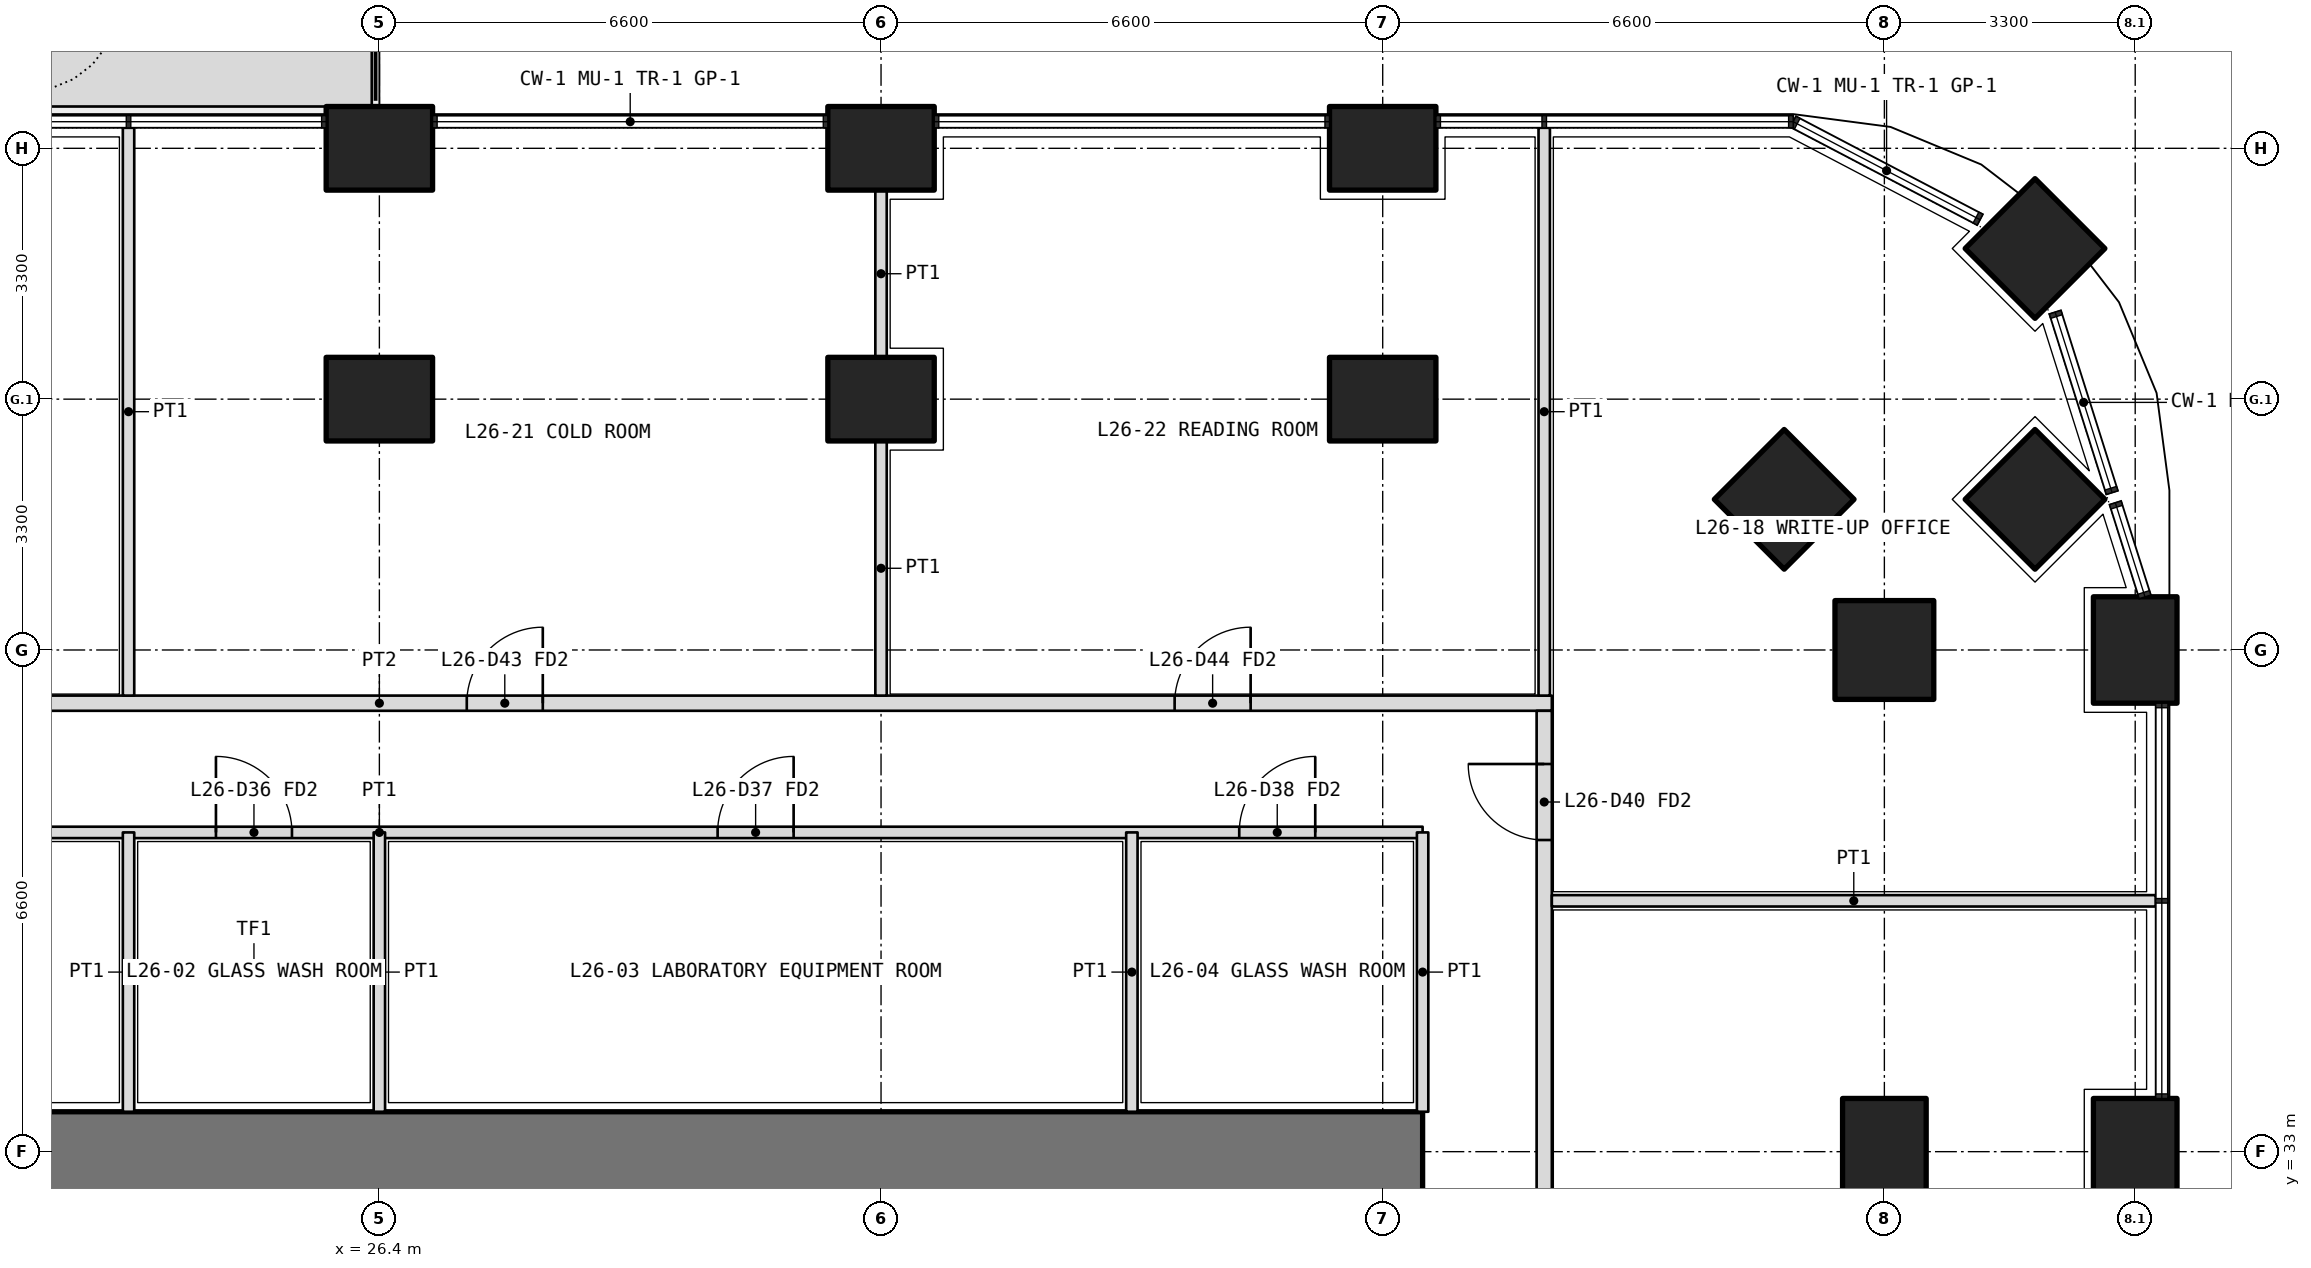
"""IFC4 building model, lengths in metres.
Left out: names, types, materials, properties, quantities, classifications, styles, units other than length and angle.
Written with IfcOpenShell. Run it as: python <this file> out.ifc"""

import sys

from ifc_helpers import new_model, si_unit, direction, frame, frame_2d, origin, origin_2d, place, context, subcontext, project, spatial, polyline, rectangle, outline, extrude, element, fill, save


model = new_model("IFC4")
c1 = context("Model", 3, precision=1e-05, world=origin(), true_north=direction((0.0, 1.0)))
c2 = subcontext(c1, "Body", "Model", "MODEL_VIEW")
j1 = project(units=[si_unit("LENGTHUNIT", "METRE"), si_unit("PLANEANGLEUNIT", "RADIAN")], contexts=[c1])
p1 = place(None, origin())
s1 = spatial("IfcSite", under=j1, at=p1, CompositionType="ELEMENT")
p2 = place(p1, origin())
s2 = spatial("IfcBuilding", under=s1, at=p2, CompositionType="ELEMENT")
p3 = place(p2, frame((0.0, 0.0, 115.8)))
s3 = spatial("IfcBuildingStorey", under=s2, at=p3, CompositionType="ELEMENT", Elevation=115.8)
p4 = place(p3, frame((48.182, 44.882, 0.0), z_axis=(0.0, 0.0, 1.0), x_axis=(0.707106781187, 0.707106781187, 0.0)))
e1 = element("IfcColumn", 1, at=p4, inside=s3, PredefinedType="COLUMN", context=c2, shape_type="SweptSolid", body=[
    extrude(rectangle(XDim=1.3, YDim=1.3, at=origin_2d()), origin(), (0.0, 0.0, 1.0), 4.2),
])
for number, where, z_axis, x_axis in (
    (2, (49.5, 33.0, 0.0), (0.0, 0.0, 1.0), (0.0, 1.0, 0.0)),
    (3, (49.5, 39.6, 0.0), (0.0, 0.0, 1.0), (0.0, 1.0, 0.0)),
    (4, (26.4, 46.2, 0.0), (0.0, 0.0, 1.0), (1.0, 0.0, 0.0)),
    (5, (33.0, 46.2, 0.0), (0.0, 0.0, 1.0), (1.0, 0.0, 0.0)),
    (6, (39.6, 46.2, 0.0), (0.0, 0.0, 1.0), (1.0, 0.0, 0.0)),
):
    element("IfcColumn", number, at=place(p3, frame(where, z_axis=z_axis, x_axis=x_axis)), inside=s3, PredefinedType="COLUMN", context=c2, shape_type="SweptSolid", body=[
        extrude(rectangle(XDim=1.4, YDim=1.1, at=origin_2d()), origin(), (0.0, 0.0, 1.0), 4.2),
    ])
for number, where, z_axis, x_axis in (
    (7, (46.2, 39.6, 0.0), (0.0, 0.0, 1.0), (1.0, 0.0, 0.0)),
    (8, (48.182, 41.582, 0.0), (0.0, 0.0, 1.0), (0.707, 0.707, 0.0)),
):
    element("IfcColumn", number, at=place(p3, frame(where, z_axis=z_axis, x_axis=x_axis)), inside=s3, PredefinedType="COLUMN", context=c2, shape_type="SweptSolid", body=[
        extrude(rectangle(XDim=1.3, YDim=1.3, at=origin_2d()), origin(), (0.0, 0.0, 1.0), 4.2),
    ])
for number, where, z_axis, x_axis in (
    (9, (26.4, 42.9, 0.0), (0.0, 0.0, 1.0), (1.0, 0.0, 0.0)),
    (10, (33.0, 42.9, 0.0), (0.0, 0.0, 1.0), (1.0, 0.0, 0.0)),
    (11, (39.6, 42.9, 0.0), (0.0, 0.0, 1.0), (1.0, 0.0, 0.0)),
):
    element("IfcColumn", number, at=place(p3, frame(where, z_axis=z_axis, x_axis=x_axis)), inside=s3, PredefinedType="COLUMN", context=c2, shape_type="SweptSolid", body=[
        extrude(rectangle(XDim=1.4, YDim=1.1, at=origin_2d()), origin(), (0.0, 0.0, 1.0), 4.2),
    ])
p5 = place(p3, frame((44.882, 41.582, 0.0), z_axis=(0.0, 0.0, 1.0), x_axis=(0.707106781187, 0.707106781187, 0.0)))
e12 = element("IfcColumn", 12, at=p5, inside=s3, PredefinedType="COLUMN", context=c2, shape_type="SweptSolid", body=[
    extrude(rectangle(XDim=1.3, YDim=1.3, at=origin_2d()), origin(), (0.0, 0.0, 1.0), 4.2),
])
p6 = place(p3, frame((46.2, 33.0, 0.0), z_axis=(0.0, 0.0, 1.0), x_axis=(0.0, 1.0, 0.0)))
e13 = element("IfcColumn", 13, at=p6, inside=s3, PredefinedType="COLUMN", context=c2, shape_type="SweptSolid", body=[
    extrude(rectangle(XDim=1.4, YDim=1.1, at=origin_2d()), origin(), (0.0, 0.0, 1.0), 4.2),
])
p7 = place(p3, origin())
e14 = element("IfcWall", 14, at=p7, inside=s3, PredefinedType="USERDEFINED", context=c2, shape_type="SweptSolid", body=[
    extrude(outline(polyline([(17.25, 46.75), (26.3, 46.75), (26.3, 47.75), (17.25, 47.75), (17.25, 46.75)]), holes=[polyline([(17.4, 46.9), (26.15, 46.9), (26.15, 47.6), (17.4, 47.6), (17.4, 46.9)])]), origin(), (0.0, 0.0, 1.0), 1.05),
])
p8 = place(p3, frame((40.125, 33.0, 0.0), z_axis=(0.0, 0.0, 1.0), x_axis=(-1.0, 0.0, 0.0)))
e15 = element("IfcWall", 15, at=p8, inside=s3, PredefinedType="SHEAR", context=c2, shape_type="SweptSolid", body=[
    extrude(rectangle(XDim=27.45, YDim=1.05, at=frame_2d((13.725, 0.0))), origin(), (0.0, 0.0, 1.0), 4.2),
])
p9 = place(p3, frame((12.675, 37.2, 0.0), z_axis=(0.0, 0.0, 1.0), x_axis=(1.0, 0.0, 0.0)))
e16 = element("IfcWall", 16, at=p9, inside=s3, PredefinedType="PARTITIONING", context=c2, shape_type="SweptSolid", body=[
    extrude(rectangle(XDim=27.45, YDim=0.15, at=frame_2d((13.725, 0.0))), origin(), (0.0, 0.0, 1.0), 2.85),
])
p10 = place(p9, frame((4.712, 0.0, 0.0)))
e17 = element("IfcOpeningElement", 17, at=p10, cuts=e16, PredefinedType="OPENING", context=c2, shape_type="SweptSolid", body=[
    extrude(rectangle(XDim=1.0, YDim=2.1, at=frame_2d((0.5, 1.05))), frame((0.0, 0.085, 0.0), z_axis=(0.0, -1.0, 0.0), x_axis=(1.0, 0.0, 0.0)), (0.0, 0.0, 1.0), 0.17),
])
p11 = place(p9, frame((11.575, 0.0, 0.0)))
e18 = element("IfcOpeningElement", 18, at=p11, cuts=e16, PredefinedType="OPENING", context=c2, shape_type="SweptSolid", body=[
    extrude(rectangle(XDim=1.0, YDim=2.1, at=frame_2d((0.5, 1.05))), frame((0.0, 0.085, 0.0), z_axis=(0.0, -1.0, 0.0), x_axis=(1.0, 0.0, 0.0)), (0.0, 0.0, 1.0), 0.17),
])
p12 = place(p9, frame((18.175, 0.0, 0.0)))
e19 = element("IfcOpeningElement", 19, at=p12, cuts=e16, PredefinedType="OPENING", context=c2, shape_type="SweptSolid", body=[
    extrude(rectangle(XDim=1.0, YDim=2.1, at=frame_2d((0.5, 1.05))), frame((0.0, 0.085, 0.0), z_axis=(0.0, -1.0, 0.0), x_axis=(1.0, 0.0, 0.0)), (0.0, 0.0, 1.0), 0.17),
])
p13 = place(p9, frame((25.038, 0.0, 0.0)))
e20 = element("IfcOpeningElement", 20, at=p13, cuts=e16, PredefinedType="OPENING", context=c2, shape_type="SweptSolid", body=[
    extrude(rectangle(XDim=1.0, YDim=2.1, at=frame_2d((0.5, 1.05))), frame((0.0, 0.085, 0.0), z_axis=(0.0, -1.0, 0.0), x_axis=(1.0, 0.0, 0.0)), (0.0, 0.0, 1.0), 0.17),
])
p14 = place(p3, frame((40.125, 33.525, 0.0), z_axis=(0.0, 0.0, 1.0), x_axis=(0.0, 1.0, 0.0)))
e21 = element("IfcWall", 21, at=p14, inside=s3, PredefinedType="PARTITIONING", context=c2, shape_type="SweptSolid", body=[
    extrude(rectangle(XDim=3.675, YDim=0.15, at=frame_2d((1.837, 0.0))), origin(), (0.0, 0.0, 1.0), 2.85),
])
p15 = place(p3, frame((23.1, 33.525, 0.0), z_axis=(0.0, 0.0, 1.0), x_axis=(0.0, 1.0, 0.0)))
e22 = element("IfcWall", 22, at=p15, inside=s3, PredefinedType="PARTITIONING", context=c2, shape_type="SweptSolid", body=[
    extrude(rectangle(XDim=3.675, YDim=0.15, at=frame_2d((1.837, 0.0))), origin(), (0.0, 0.0, 1.0), 3.9),
])
p16 = place(p3, frame((26.4, 33.525, 0.0), z_axis=(0.0, 0.0, 1.0), x_axis=(0.0, 1.0, 0.0)))
e23 = element("IfcWall", 23, at=p16, inside=s3, PredefinedType="PARTITIONING", context=c2, shape_type="SweptSolid", body=[
    extrude(rectangle(XDim=3.675, YDim=0.15, at=frame_2d((1.837, 0.0))), origin(), (0.0, 0.0, 1.0), 2.85),
])
p17 = place(p3, frame((36.3, 33.525, 0.0), z_axis=(0.0, 0.0, 1.0), x_axis=(0.0, 1.0, 0.0)))
e24 = element("IfcWall", 24, at=p17, inside=s3, PredefinedType="PARTITIONING", context=c2, shape_type="SweptSolid", body=[
    extrude(rectangle(XDim=3.675, YDim=0.15, at=frame_2d((1.837, 0.0))), origin(), (0.0, 0.0, 1.0), 3.9),
])
p18 = place(p3, frame((10.975, 38.9, 0.0), z_axis=(0.0, 0.0, 1.0), x_axis=(1.0, 0.0, 0.0)))
e25 = element("IfcWall", 25, at=p18, inside=s3, PredefinedType="PARTITIONING", context=c2, shape_type="SweptSolid", body=[
    extrude(rectangle(XDim=30.85, YDim=0.2, at=frame_2d((15.425, 0.0))), origin(), (0.0, 0.0, 1.0), 2.85),
])
p19 = place(p18, frame((0.562, 0.0, 0.0)))
e26 = element("IfcOpeningElement", 26, at=p19, cuts=e25, PredefinedType="OPENING", context=c2, shape_type="SweptSolid", body=[
    extrude(rectangle(XDim=1.2, YDim=2.1, at=frame_2d((0.6, 1.05))), frame((0.0, 0.11, 0.0), z_axis=(0.0, -1.0, 0.0), x_axis=(1.0, 0.0, 0.0)), (0.0, 0.0, 1.0), 0.22),
])
p20 = place(p18, frame((6.675, 0.0, 0.0)))
e27 = element("IfcOpeningElement", 27, at=p20, cuts=e25, PredefinedType="OPENING", context=c2, shape_type="SweptSolid", body=[
    extrude(rectangle(XDim=1.0, YDim=2.1, at=frame_2d((0.5, 1.05))), frame((0.0, 0.11, 0.0), z_axis=(0.0, -1.0, 0.0), x_axis=(1.0, 0.0, 0.0)), (0.0, 0.0, 1.0), 0.22),
])
p21 = place(p18, frame((16.575, 0.0, 0.0)))
e28 = element("IfcOpeningElement", 28, at=p21, cuts=e25, PredefinedType="OPENING", context=c2, shape_type="SweptSolid", body=[
    extrude(rectangle(XDim=1.0, YDim=2.1, at=frame_2d((0.5, 1.05))), frame((0.0, 0.11, 0.0), z_axis=(0.0, -1.0, 0.0), x_axis=(1.0, 0.0, 0.0)), (0.0, 0.0, 1.0), 0.22),
])
p22 = place(p18, frame((25.887, 0.0, 0.0)))
e29 = element("IfcOpeningElement", 29, at=p22, cuts=e25, PredefinedType="OPENING", context=c2, shape_type="SweptSolid", body=[
    extrude(rectangle(XDim=1.0, YDim=2.1, at=frame_2d((0.5, 1.05))), frame((0.0, 0.11, 0.0), z_axis=(0.0, -1.0, 0.0), x_axis=(1.0, 0.0, 0.0)), (0.0, 0.0, 1.0), 0.22),
])
p23 = place(p3, frame((41.725, 11.175, 0.0), z_axis=(0.0, 0.0, 1.0), x_axis=(0.0, 1.0, 0.0)))
e30 = element("IfcWall", 30, at=p23, inside=s3, PredefinedType="PARTITIONING", context=c2, shape_type="SweptSolid", body=[
    extrude(rectangle(XDim=27.625, YDim=0.2, at=frame_2d((13.812, 0.0))), origin(), (0.0, 0.0, 1.0), 2.85),
])
p24 = place(p23, frame((3.762, 0.0, 0.0)))
e31 = element("IfcOpeningElement", 31, at=p24, cuts=e30, PredefinedType="OPENING", context=c2, shape_type="SweptSolid", body=[
    extrude(rectangle(XDim=1.0, YDim=2.1, at=frame_2d((0.5, 1.05))), frame((0.0, 0.11, 0.0), z_axis=(0.0, -1.0, 0.0), x_axis=(1.0, 0.0, 0.0)), (0.0, 0.0, 1.0), 0.22),
])
p25 = place(p23, frame((9.625, 0.0, 0.0)))
e32 = element("IfcOpeningElement", 32, at=p25, cuts=e30, PredefinedType="OPENING", context=c2, shape_type="SweptSolid", body=[
    extrude(rectangle(XDim=1.0, YDim=2.1, at=frame_2d((0.5, 1.05))), frame((0.0, 0.11, 0.0), z_axis=(0.0, -1.0, 0.0), x_axis=(1.0, 0.0, 0.0)), (0.0, 0.0, 1.0), 0.22),
])
p26 = place(p23, frame((12.975, 0.0, 0.0)))
e33 = element("IfcOpeningElement", 33, at=p26, cuts=e30, PredefinedType="OPENING", context=c2, shape_type="SweptSolid", body=[
    extrude(rectangle(XDim=0.9, YDim=2.1, at=frame_2d((0.45, 1.05))), frame((0.0, 0.11, 0.0), z_axis=(0.0, -1.0, 0.0), x_axis=(1.0, 0.0, 0.0)), (0.0, 0.0, 1.0), 0.22),
])
p27 = place(p23, frame((19.675, 0.0, 0.0)))
e34 = element("IfcOpeningElement", 34, at=p27, cuts=e30, PredefinedType="OPENING", context=c2, shape_type="SweptSolid", body=[
    extrude(rectangle(XDim=1.0, YDim=2.1, at=frame_2d((0.5, 1.05))), frame((0.0, 0.11, 0.0), z_axis=(0.0, -1.0, 0.0), x_axis=(1.0, 0.0, 0.0)), (0.0, 0.0, 1.0), 0.22),
])
p28 = place(p23, frame((25.925, 0.0, 0.0)))
e35 = element("IfcOpeningElement", 35, at=p28, cuts=e30, PredefinedType="OPENING", context=c2, shape_type="SweptSolid", body=[
    extrude(rectangle(XDim=1.0, YDim=2.1, at=frame_2d((0.5, 1.05))), frame((0.0, 0.11, 0.0), z_axis=(0.0, -1.0, 0.0), x_axis=(1.0, 0.0, 0.0)), (0.0, 0.0, 1.0), 0.22),
])
p29 = place(p3, frame((41.725, 46.47, 0.0), z_axis=(0.0, 0.0, 1.0), x_axis=(0.0, -1.0, 0.0)))
e36 = element("IfcWall", 36, at=p29, inside=s3, PredefinedType="PARTITIONING", context=c2, shape_type="SweptSolid", body=[
    extrude(rectangle(XDim=7.47, YDim=0.15, at=frame_2d((3.735, 0.0))), origin(), (0.0, 0.0, 1.0), 2.7),
])
p30 = place(p3, frame((49.77, 36.3, 0.0), z_axis=(0.0, 0.0, 1.0), x_axis=(-1.0, 0.0, 0.0)))
e37 = element("IfcWall", 37, at=p30, inside=s3, PredefinedType="PARTITIONING", context=c2, shape_type="SweptSolid", body=[
    extrude(rectangle(XDim=7.945, YDim=0.15, at=frame_2d((3.973, 0.0))), origin(), (0.0, 0.0, 1.0), 2.7),
])
p31 = place(p3, frame((23.1, 46.47, 0.0), z_axis=(0.0, 0.0, 1.0), x_axis=(0.0, -1.0, 0.0)))
e38 = element("IfcWall", 38, at=p31, inside=s3, PredefinedType="PARTITIONING", context=c2, shape_type="SweptSolid", body=[
    extrude(rectangle(XDim=7.47, YDim=0.15, at=frame_2d((3.735, 0.0))), origin(), (0.0, 0.0, 1.0), 2.7),
])
p32 = place(p3, frame((33.0, 45.65, 0.0), z_axis=(0.0, 0.0, 1.0), x_axis=(0.0, -1.0, 0.0)))
e39 = element("IfcWall", 39, at=p32, inside=s3, PredefinedType="PARTITIONING", context=c2, shape_type="SweptSolid", body=[
    extrude(rectangle(XDim=2.2, YDim=0.15, at=frame_2d((1.1, 0.0))), origin(), (0.0, 0.0, 1.0), 2.85),
])
p33 = place(p3, frame((33.0, 42.35, 0.0), z_axis=(0.0, 0.0, 1.0), x_axis=(0.0, -1.0, 0.0)))
e40 = element("IfcWall", 40, at=p33, inside=s3, PredefinedType="PARTITIONING", context=c2, shape_type="SweptSolid", body=[
    extrude(rectangle(XDim=3.35, YDim=0.15, at=frame_2d((1.675, 0.0))), origin(), (0.0, 0.0, 1.0), 2.85),
])
p34 = place(p11, origin())
e41 = element("IfcDoor", 41, at=p34, inside=s3, OperationType="SINGLE_SWING_LEFT", PredefinedType="DOOR", context=c2, shape_type="SweptSolid", body=[
    extrude(rectangle(XDim=1.0, YDim=2.1, at=frame_2d((0.5, 1.05))), frame((0.0, 0.025, 0.0), z_axis=(0.0, -1.0, 0.0), x_axis=(1.0, 0.0, 0.0)), (0.0, 0.0, 1.0), 0.05),
])
fill(e18, e41)
p35 = place(p12, origin())
e42 = element("IfcDoor", 42, at=p35, inside=s3, OperationType="SINGLE_SWING_RIGHT", PredefinedType="DOOR", context=c2, shape_type="SweptSolid", body=[
    extrude(rectangle(XDim=1.0, YDim=2.1, at=frame_2d((0.5, 1.05))), frame((0.0, 0.025, 0.0), z_axis=(0.0, -1.0, 0.0), x_axis=(1.0, 0.0, 0.0)), (0.0, 0.0, 1.0), 0.05),
])
fill(e19, e42)
p36 = place(p13, origin())
e43 = element("IfcDoor", 43, at=p36, inside=s3, OperationType="SINGLE_SWING_RIGHT", PredefinedType="DOOR", context=c2, shape_type="SweptSolid", body=[
    extrude(rectangle(XDim=1.0, YDim=2.1, at=frame_2d((0.5, 1.05))), frame((0.0, 0.025, 0.0), z_axis=(0.0, -1.0, 0.0), x_axis=(1.0, 0.0, 0.0)), (0.0, 0.0, 1.0), 0.05),
])
fill(e20, e43)
p37 = place(p28, origin())
e44 = element("IfcDoor", 44, at=p37, inside=s3, OperationType="SINGLE_SWING_RIGHT", PredefinedType="DOOR", context=c2, shape_type="SweptSolid", body=[
    extrude(rectangle(XDim=1.0, YDim=2.1, at=frame_2d((0.5, 1.05))), frame((0.0, 0.025, 0.0), z_axis=(0.0, -1.0, 0.0), x_axis=(1.0, 0.0, 0.0)), (0.0, 0.0, 1.0), 0.05),
])
fill(e35, e44)
p38 = place(p21, origin())
e45 = element("IfcDoor", 45, at=p38, inside=s3, OperationType="SINGLE_SWING_RIGHT", PredefinedType="DOOR", context=c2, shape_type="SweptSolid", body=[
    extrude(rectangle(XDim=1.0, YDim=2.1, at=frame_2d((0.5, 1.05))), frame((0.0, 0.025, 0.0), z_axis=(0.0, -1.0, 0.0), x_axis=(1.0, 0.0, 0.0)), (0.0, 0.0, 1.0), 0.05),
])
fill(e28, e45)
p39 = place(p22, origin())
e46 = element("IfcDoor", 46, at=p39, inside=s3, OperationType="SINGLE_SWING_RIGHT", PredefinedType="DOOR", context=c2, shape_type="SweptSolid", body=[
    extrude(rectangle(XDim=1.0, YDim=2.1, at=frame_2d((0.5, 1.05))), frame((0.0, 0.025, 0.0), z_axis=(0.0, -1.0, 0.0), x_axis=(1.0, 0.0, 0.0)), (0.0, 0.0, 1.0), 0.05),
])
fill(e29, e46)
save(model, sys.argv[1])
